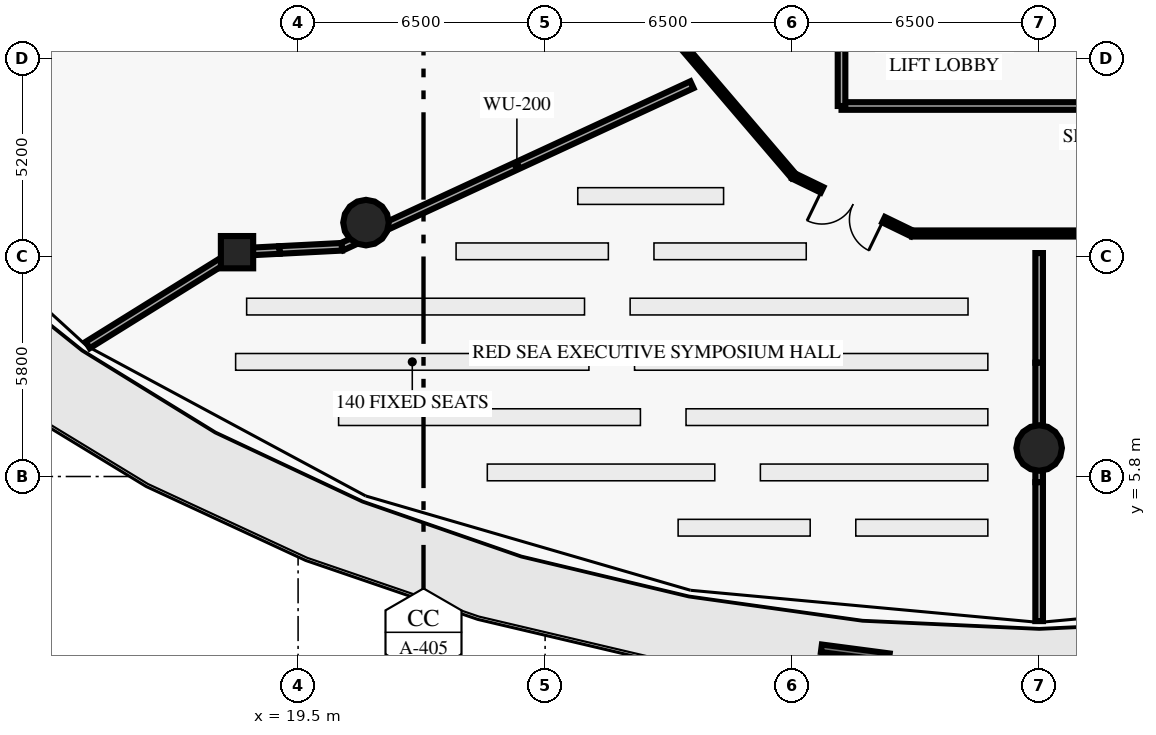
"""IFC4 building model, lengths in metres.
Left out: names, types, materials, properties, quantities, classifications, styles, units other than length and angle.
Written with IfcOpenShell. Run it as: python <this file> out.ifc"""

import sys

from ifc_helpers import new_model, si_unit, direction, frame, frame_2d, origin, origin_2d, place, context, subcontext, project, spatial, rectangle, circle, extrude, element, fill, save


model = new_model("IFC4")
c1 = context("Model", 3, precision=1e-05, world=origin(), true_north=direction((0.0, 1.0)))
c2 = subcontext(c1, "Body", "Model", "MODEL_VIEW")
j1 = project(units=[si_unit("LENGTHUNIT", "METRE"), si_unit("PLANEANGLEUNIT", "RADIAN")], contexts=[c1])
p1 = place(None, origin())
s1 = spatial("IfcSite", under=j1, at=p1, CompositionType="ELEMENT")
p2 = place(p1, origin())
s2 = spatial("IfcBuilding", under=s1, at=p2, CompositionType="ELEMENT")
p3 = place(p2, frame((0.0, 0.0, 11.0)))
s3 = spatial("IfcBuildingStorey", under=s2, at=p3, CompositionType="ELEMENT", Elevation=11.0)
for number, where, z_axis, x_axis in (
    (1, (21.287, 12.481, 0.0), (0.0, 0.0, 1.0), (1.0, 0.0, 0.0)),
    (2, (39.0, 6.55, 0.0), (0.0, 0.0, 1.0), (1.0, 0.0, 0.0)),
):
    element("IfcColumn", number, at=place(p3, frame(where, z_axis=z_axis, x_axis=x_axis)), inside=s3, PredefinedType="COLUMN", context=c2, shape_type="SweptSolid", body=[
        extrude(circle(Radius=0.6, at=origin_2d()), origin(), (0.0, 0.0, 1.0), 4.7),
    ])
p4 = place(p3, frame((17.893, 11.703, 0.0), z_axis=(0.0, 0.0, 1.0), x_axis=(1.0, 0.0, 0.0)))
e3 = element("IfcColumn", 3, at=p4, inside=s3, PredefinedType="COLUMN", context=c2, shape_type="SweptSolid", body=[
    extrude(rectangle(XDim=0.85, YDim=0.85, at=origin_2d()), origin(), (0.0, 0.0, 1.0), 4.7),
])
p5 = place(p3, frame((35.055, 1.044, 0.0), z_axis=(0.0, 0.0, 1.0), x_axis=(-0.991436284929, 0.130591320255, 0.0)))
e4 = element("IfcWall", 4, at=p5, inside=s3, PredefinedType="ELEMENTEDWALL", context=c2, shape_type="SweptSolid", body=[
    extrude(rectangle(XDim=1.8, YDim=0.2, at=frame_2d((0.9, 0.0))), origin(), (0.0, 0.0, 1.0), 0.65),
])
p6 = place(p3, frame((33.8, 15.55, 0.0), z_axis=(0.0, 0.0, 1.0), x_axis=(1.0, 0.0, 0.0)))
e5 = element("IfcWall", 5, at=p6, inside=s3, PredefinedType="SOLIDWALL", context=c2, shape_type="SweptSolid", body=[
    extrude(rectangle(XDim=7.55, YDim=0.2, at=frame_2d((3.775, 0.0))), origin(), (0.0, 0.0, 1.0), 4.7),
])
p7 = place(p3, frame((33.8, 15.55, 0.0), z_axis=(0.0, 0.0, 1.0), x_axis=(0.0, 1.0, 0.0)))
e6 = element("IfcWall", 6, at=p7, inside=s3, PredefinedType="SOLIDWALL", context=c2, shape_type="SweptSolid", body=[
    extrude(rectangle(XDim=2.8, YDim=0.2, at=frame_2d((1.4, 0.0))), origin(), (0.0, 0.0, 1.0), 4.7),
])
p8 = place(p3, frame((27.811, 19.24, 0.0), z_axis=(0.0, 0.0, 1.0), x_axis=(0.649652680018, -0.760231145998, 0.0)))
e7 = element("IfcWall", 7, at=p8, inside=s3, PredefinedType="PARTITIONING", context=c2, shape_type="SweptSolid", body=[
    extrude(rectangle(XDim=7.279, YDim=0.16, at=frame_2d((3.64, 0.0))), origin(), (0.0, 0.0, 1.0), 4.7),
])
p9 = place(p3, frame((35.656, 12.195, 0.0), z_axis=(0.0, 0.0, 1.0), x_axis=(-0.899789784655, 0.436323668199, 0.0)))
e8 = element("IfcWall", 8, at=p9, inside=s3, PredefinedType="PARTITIONING", context=c2, shape_type="SweptSolid", body=[
    extrude(rectangle(XDim=3.463, YDim=0.16, at=frame_2d((1.731, 0.0))), origin(), (0.0, 0.0, 1.0), 4.7),
])
p10 = place(p9, frame((0.832, 0.0, 0.0)))
e9 = element("IfcOpeningElement", 9, at=p10, cuts=e8, PredefinedType="OPENING", context=c2, shape_type="SweptSolid", body=[
    extrude(rectangle(XDim=1.8, YDim=2.3, at=frame_2d((0.9, 1.15))), frame((0.0, 0.09, 0.0), z_axis=(0.0, -1.0, 0.0), x_axis=(1.0, 0.0, 0.0)), (0.0, 0.0, 1.0), 0.18),
])
p11 = place(p3, frame((35.656, 12.195, 0.0), z_axis=(0.0, 0.0, 1.0), x_axis=(1.0, 0.0, 0.0)))
e10 = element("IfcWall", 10, at=p11, inside=s3, PredefinedType="PARTITIONING", context=c2, shape_type="SweptSolid", body=[
    extrude(rectangle(XDim=6.688, YDim=0.16, at=frame_2d((3.344, 0.0))), origin(), (0.0, 0.0, 1.0), 4.7),
])
p12 = place(p3, frame((29.864, 16.109, 0.0), z_axis=(0.0, 0.0, 1.0), x_axis=(-0.907520382507, -0.420008041988, 0.0)))
e11 = element("IfcWall", 11, at=p12, inside=s3, PredefinedType="PARTITIONING", context=c2, shape_type="SweptSolid", body=[
    extrude(rectangle(XDim=10.152, YDim=0.2, at=frame_2d((5.076, 0.0))), origin(), (0.0, 0.0, 1.0), 4.7),
])
p13 = place(p3, frame((20.651, 11.845, 0.0), z_axis=(0.0, 0.0, 1.0), x_axis=(-0.998692725363, -0.051115949639, 0.0)))
e12 = element("IfcWall", 12, at=p13, inside=s3, PredefinedType="PARTITIONING", context=c2, shape_type="SweptSolid", body=[
    extrude(rectangle(XDim=1.643, YDim=0.2, at=frame_2d((0.822, 0.0))), origin(), (0.0, 0.0, 1.0), 4.7),
])
p14 = place(p3, frame((19.01, 11.761, 0.0), z_axis=(0.0, 0.0, 1.0), x_axis=(-0.998649603439, -0.051951607785, 0.0)))
e13 = element("IfcWall", 13, at=p14, inside=s3, PredefinedType="PARTITIONING", context=c2, shape_type="SweptSolid", body=[
    extrude(rectangle(XDim=1.118, YDim=0.2, at=frame_2d((0.559, 0.0))), origin(), (0.0, 0.0, 1.0), 4.24),
])
p15 = place(p3, frame((17.893, 11.703, 0.0), z_axis=(0.0, 0.0, 1.0), x_axis=(-0.849173378653, -0.528114166623, 0.0)))
e14 = element("IfcWall", 14, at=p15, inside=s3, PredefinedType="PARTITIONING", context=c2, shape_type="SweptSolid", body=[
    extrude(rectangle(XDim=4.626, YDim=0.2, at=frame_2d((2.313, 0.0))), origin(), (0.0, 0.0, 1.0), 4.7),
])
p16 = place(p3, frame((39.0, 11.68, 0.0), z_axis=(0.0, 0.0, 1.0), x_axis=(0.0, -1.0, 0.0)))
e15 = element("IfcWall", 15, at=p16, inside=s3, PredefinedType="PARTITIONING", context=c2, shape_type="SweptSolid", body=[
    extrude(rectangle(XDim=2.885, YDim=0.2, at=frame_2d((1.442, 0.0))), origin(), (0.0, 0.0, 1.0), 4.7),
])
p17 = place(p3, frame((39.0, 8.795, 0.0), z_axis=(0.0, 0.0, 1.0), x_axis=(0.0, -1.0, 0.0)))
e16 = element("IfcWall", 16, at=p17, inside=s3, PredefinedType="PARTITIONING", context=c2, shape_type="SweptSolid", body=[
    extrude(rectangle(XDim=2.259, YDim=0.2, at=frame_2d((1.129, 0.0))), origin(), (0.0, 0.0, 1.0), 3.765),
])
p18 = place(p3, frame((39.0, 6.536, 0.0), z_axis=(0.0, 0.0, 1.0), x_axis=(0.0, -1.0, 0.0)))
e17 = element("IfcWall", 17, at=p18, inside=s3, PredefinedType="PARTITIONING", context=c2, shape_type="SweptSolid", body=[
    extrude(rectangle(XDim=0.886, YDim=0.2, at=frame_2d((0.443, 0.0))), origin(), (0.0, 0.0, 1.0), 4.7),
])
p19 = place(p3, frame((39.0, 5.65, 0.0), z_axis=(0.0, 0.0, 1.0), x_axis=(0.0, -1.0, 0.0)))
e18 = element("IfcWall", 18, at=p19, inside=s3, PredefinedType="PARTITIONING", context=c2, shape_type="SweptSolid", body=[
    extrude(rectangle(XDim=3.655, YDim=0.2, at=frame_2d((1.827, 0.0))), origin(), (0.0, 0.0, 1.0), 4.7),
])
p20 = place(p10, origin())
e19 = element("IfcDoor", 19, at=p20, inside=s3, OperationType="DOUBLE_DOOR_SINGLE_SWING", PredefinedType="DOOR", context=c2, shape_type="SweptSolid", body=[
    extrude(rectangle(XDim=1.8, YDim=2.3, at=frame_2d((0.9, 1.15))), frame((0.0, 0.025, 0.0), z_axis=(0.0, -1.0, 0.0), x_axis=(1.0, 0.0, 0.0)), (0.0, 0.0, 1.0), 0.05),
])
fill(e9, e19)
save(model, sys.argv[1])
